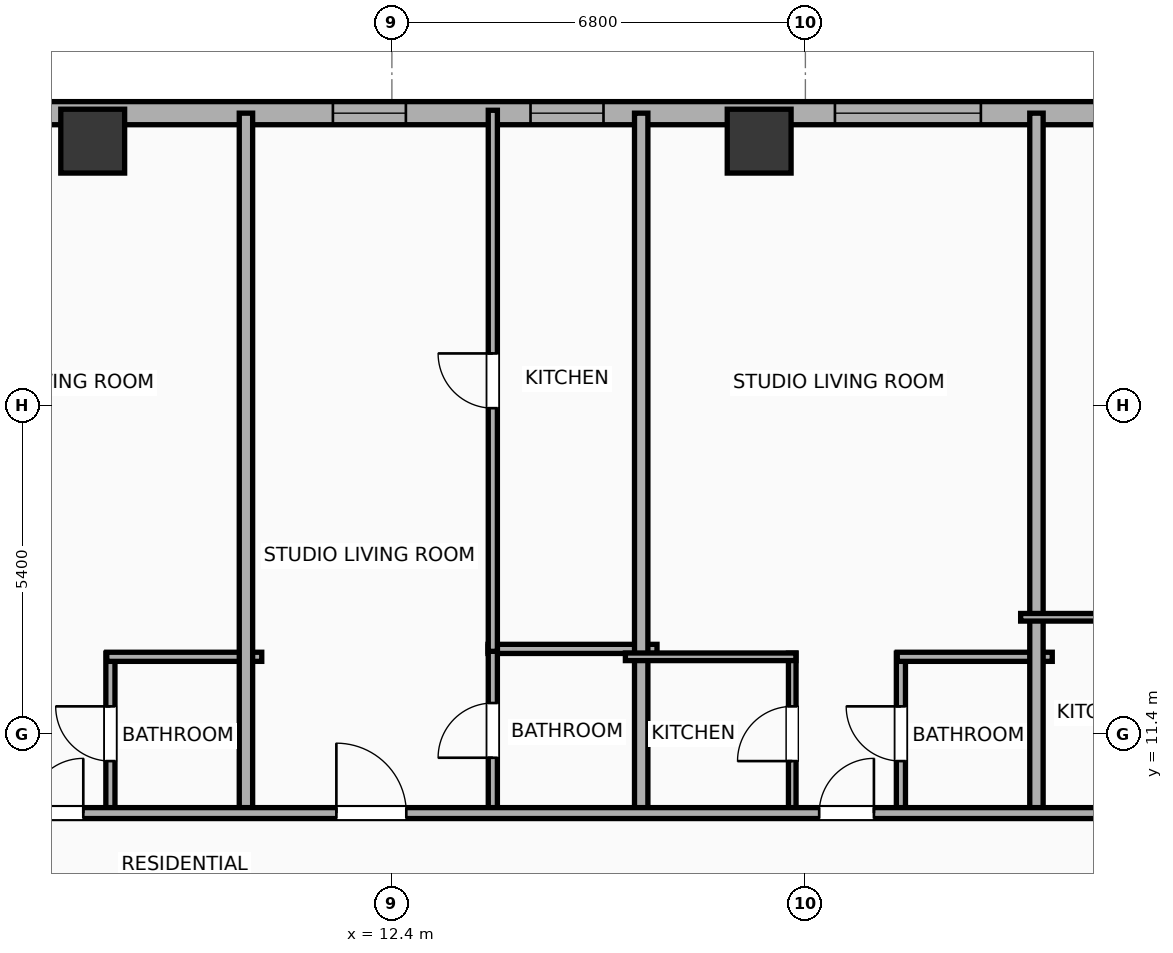
"""IFC4 building model, lengths in metres.
Left out: names, types, materials, properties, quantities, classifications, styles, units other than length and angle.
Written with IfcOpenShell. Run it as: python <this file> out.ifc"""

import sys

from ifc_helpers import new_model, si_unit, direction, frame, frame_2d, origin, origin_2d, place, context, subcontext, project, spatial, rectangle, hollow_rectangle, extrude, element, fill, save


model = new_model("IFC4")
c1 = context("Model", 3, precision=1e-05, world=origin(), true_north=direction((0.0, 1.0)))
c2 = subcontext(c1, "Body", "Model", "MODEL_VIEW")
j1 = project(units=[si_unit("LENGTHUNIT", "METRE"), si_unit("PLANEANGLEUNIT", "RADIAN")], contexts=[c1])
p1 = place(None, origin())
s1 = spatial("IfcSite", under=j1, at=p1, CompositionType="ELEMENT")
p2 = place(p1, origin())
s2 = spatial("IfcBuilding", under=s1, at=p2, CompositionType="ELEMENT")
p3 = place(p2, frame((0.0, 0.0, 128.7)))
s3 = spatial("IfcBuildingStorey", under=s2, at=p3, CompositionType="ELEMENT", Elevation=128.7)
for number, where, z_axis, x_axis in (
    (1, (18.44, 21.15, 0.0), (0.0, 0.0, 1.0), (1.0, 0.0, 0.0)),
    (2, (7.48, 21.15, 0.0), (0.0, 0.0, 1.0), (1.0, 0.0, 0.0)),
):
    element("IfcColumn", number, at=place(p3, frame(where, z_axis=z_axis, x_axis=x_axis)), inside=s3, PredefinedType="COLUMN", context=c2, shape_type="SweptSolid", body=[
        extrude(hollow_rectangle(XDim=1.05, YDim=1.05, WallThickness=0.036, at=origin_2d()), origin(), (0.0, 0.0, 1.0), 3.9),
    ])
p4 = place(p3, frame((-25.381, 21.61, 0.0), z_axis=(0.0, 0.0, 1.0), x_axis=(1.0, 0.0, 0.0)))
e3 = element("IfcWall", 3, at=p4, inside=s3, PredefinedType="ELEMENTEDWALL", context=c2, shape_type="SweptSolid", body=[
    extrude(rectangle(XDim=54.763, YDim=0.38, at=frame_2d((27.381, 0.0))), origin(), (0.0, 0.0, 1.0), 3.65),
])
p5 = place(p4, frame((5.645, 0.0, 0.75)))
e4 = element("IfcOpeningElement", 4, at=p5, cuts=e3, PredefinedType="OPENING", context=c2, shape_type="SweptSolid", body=[
    extrude(rectangle(XDim=2.4, YDim=2.1, at=frame_2d((1.2, 1.05))), frame((0.0, 0.2, 0.0), z_axis=(0.0, -1.0, 0.0), x_axis=(1.0, 0.0, 0.0)), (0.0, 0.0, 1.0), 0.4),
])
p6 = place(p4, frame((45.067, 0.0, 0.75)))
e5 = element("IfcOpeningElement", 5, at=p6, cuts=e3, PredefinedType="OPENING", context=c2, shape_type="SweptSolid", body=[
    extrude(rectangle(XDim=2.4, YDim=2.1, at=frame_2d((1.2, 1.05))), frame((0.0, 0.2, 0.0), z_axis=(0.0, -1.0, 0.0), x_axis=(1.0, 0.0, 0.0)), (0.0, 0.0, 1.0), 0.4),
])
p7 = place(p4, frame((1.286, 0.0, 0.75)))
e6 = element("IfcOpeningElement", 6, at=p7, cuts=e3, PredefinedType="OPENING", context=c2, shape_type="SweptSolid", body=[
    extrude(rectangle(XDim=1.2, YDim=2.05, at=frame_2d((0.6, 1.025))), frame((0.0, 0.2, 0.0), z_axis=(0.0, -1.0, 0.0), x_axis=(1.0, 0.0, 0.0)), (0.0, 0.0, 1.0), 0.4),
])
p8 = place(p4, frame((3.501, 0.0, 0.75)))
e7 = element("IfcOpeningElement", 7, at=p8, cuts=e3, PredefinedType="OPENING", context=c2, shape_type="SweptSolid", body=[
    extrude(rectangle(XDim=1.2, YDim=2.05, at=frame_2d((0.6, 1.025))), frame((0.0, 0.2, 0.0), z_axis=(0.0, -1.0, 0.0), x_axis=(1.0, 0.0, 0.0)), (0.0, 0.0, 1.0), 0.4),
])
p9 = place(p4, frame((12.031, 0.0, 0.75)))
e8 = element("IfcOpeningElement", 8, at=p9, cuts=e3, PredefinedType="OPENING", context=c2, shape_type="SweptSolid", body=[
    extrude(rectangle(XDim=1.2, YDim=2.05, at=frame_2d((0.6, 1.025))), frame((0.0, 0.2, 0.0), z_axis=(0.0, -1.0, 0.0), x_axis=(1.0, 0.0, 0.0)), (0.0, 0.0, 1.0), 0.4),
])
p10 = place(p4, frame((19.805, 0.0, 0.75)))
e9 = element("IfcOpeningElement", 9, at=p10, cuts=e3, PredefinedType="OPENING", context=c2, shape_type="SweptSolid", body=[
    extrude(rectangle(XDim=1.2, YDim=2.05, at=frame_2d((0.6, 1.025))), frame((0.0, 0.2, 0.0), z_axis=(0.0, -1.0, 0.0), x_axis=(1.0, 0.0, 0.0)), (0.0, 0.0, 1.0), 0.4),
])
p11 = place(p4, frame((16.555, 0.0, 0.75)))
e10 = element("IfcOpeningElement", 10, at=p11, cuts=e3, PredefinedType="OPENING", context=c2, shape_type="SweptSolid", body=[
    extrude(rectangle(XDim=1.2, YDim=2.05, at=frame_2d((0.6, 1.025))), frame((0.0, 0.2, 0.0), z_axis=(0.0, -1.0, 0.0), x_axis=(1.0, 0.0, 0.0)), (0.0, 0.0, 1.0), 0.4),
])
p12 = place(p4, frame((23.866, 0.0, 0.75)))
e11 = element("IfcOpeningElement", 11, at=p12, cuts=e3, PredefinedType="OPENING", context=c2, shape_type="SweptSolid", body=[
    extrude(rectangle(XDim=1.2, YDim=2.05, at=frame_2d((0.6, 1.025))), frame((0.0, 0.2, 0.0), z_axis=(0.0, -1.0, 0.0), x_axis=(1.0, 0.0, 0.0)), (0.0, 0.0, 1.0), 0.4),
])
p13 = place(p4, frame((27.116, 0.0, 0.75)))
e12 = element("IfcOpeningElement", 12, at=p13, cuts=e3, PredefinedType="OPENING", context=c2, shape_type="SweptSolid", body=[
    extrude(rectangle(XDim=1.2, YDim=2.05, at=frame_2d((0.6, 1.025))), frame((0.0, 0.2, 0.0), z_axis=(0.0, -1.0, 0.0), x_axis=(1.0, 0.0, 0.0)), (0.0, 0.0, 1.0), 0.4),
])
p14 = place(p4, frame((30.931, 0.0, 0.75)))
e13 = element("IfcOpeningElement", 13, at=p14, cuts=e3, PredefinedType="OPENING", context=c2, shape_type="SweptSolid", body=[
    extrude(rectangle(XDim=1.2, YDim=2.05, at=frame_2d((0.6, 1.025))), frame((0.0, 0.2, 0.0), z_axis=(0.0, -1.0, 0.0), x_axis=(1.0, 0.0, 0.0)), (0.0, 0.0, 1.0), 0.4),
])
p15 = place(p4, frame((36.811, 0.0, 0.75)))
e14 = element("IfcOpeningElement", 14, at=p15, cuts=e3, PredefinedType="OPENING", context=c2, shape_type="SweptSolid", body=[
    extrude(rectangle(XDim=1.2, YDim=2.05, at=frame_2d((0.6, 1.025))), frame((0.0, 0.2, 0.0), z_axis=(0.0, -1.0, 0.0), x_axis=(1.0, 0.0, 0.0)), (0.0, 0.0, 1.0), 0.4),
])
p16 = place(p4, frame((40.061, 0.0, 0.75)))
e15 = element("IfcOpeningElement", 15, at=p16, cuts=e3, PredefinedType="OPENING", context=c2, shape_type="SweptSolid", body=[
    extrude(rectangle(XDim=1.2, YDim=2.05, at=frame_2d((0.6, 1.025))), frame((0.0, 0.2, 0.0), z_axis=(0.0, -1.0, 0.0), x_axis=(1.0, 0.0, 0.0)), (0.0, 0.0, 1.0), 0.4),
])
p17 = place(p4, frame((50.527, 0.0, 0.75)))
e16 = element("IfcOpeningElement", 16, at=p17, cuts=e3, PredefinedType="OPENING", context=c2, shape_type="SweptSolid", body=[
    extrude(rectangle(XDim=1.2, YDim=2.05, at=frame_2d((0.6, 1.025))), frame((0.0, 0.2, 0.0), z_axis=(0.0, -1.0, 0.0), x_axis=(1.0, 0.0, 0.0)), (0.0, 0.0, 1.0), 0.4),
])
p18 = place(p3, frame((7.771, 10.08, 0.0), z_axis=(0.0, 0.0, 1.0), x_axis=(0.0, 1.0, 0.0)))
e17 = element("IfcWall", 17, at=p18, inside=s3, PredefinedType="PLUMBINGWALL", context=c2, shape_type="SweptSolid", body=[
    extrude(rectangle(XDim=2.65, YDim=0.15, at=frame_2d((1.325, 0.0))), origin(), (0.0, 0.0, 1.0), 3.65),
])
p19 = place(p18, frame((0.875, 0.0, 0.0)))
e18 = element("IfcOpeningElement", 18, at=p19, cuts=e17, PredefinedType="OPENING", context=c2, shape_type="SweptSolid", body=[
    extrude(rectangle(XDim=0.9, YDim=2.05, at=frame_2d((0.45, 1.025))), frame((0.0, 0.085, 0.0), z_axis=(0.0, -1.0, 0.0), x_axis=(1.0, 0.0, 0.0)), (0.0, 0.0, 1.0), 0.17),
])
p20 = place(p3, frame((7.711, 12.67, 0.0), z_axis=(0.0, 0.0, 1.0), x_axis=(1.0, 0.0, 0.0)))
e19 = element("IfcWall", 19, at=p20, inside=s3, PredefinedType="PLUMBINGWALL", context=c2, shape_type="SweptSolid", body=[
    extrude(rectangle(XDim=2.549, YDim=0.15, at=frame_2d((1.274, 0.0))), origin(), (0.0, 0.0, 1.0), 3.65),
])
p21 = place(p3, frame((10.0, 10.02, 0.0), z_axis=(0.0, 0.0, 1.0), x_axis=(0.0, 1.0, 0.0)))
e20 = element("IfcWall", 20, at=p21, inside=s3, PredefinedType="PARTITIONING", context=c2, shape_type="SweptSolid", body=[
    extrude(rectangle(XDim=11.59, YDim=0.22, at=frame_2d((5.795, 0.0))), origin(), (0.0, 0.0, 1.0), 3.65),
])
p22 = place(p3, frame((13.98, 12.8, 0.0), z_axis=(0.0, 0.0, 1.0), x_axis=(1.0, 0.0, 0.0)))
e21 = element("IfcWall", 21, at=p22, inside=s3, PredefinedType="PLUMBINGWALL", context=c2, shape_type="SweptSolid", body=[
    extrude(rectangle(XDim=2.78, YDim=0.15, at=frame_2d((1.39, 0.0))), origin(), (0.0, 0.0, 1.0), 3.65),
])
p23 = place(p3, frame((14.06, 10.08, 0.0), z_axis=(0.0, 0.0, 1.0), x_axis=(0.0, 1.0, 0.0)))
e22 = element("IfcWall", 22, at=p23, inside=s3, PredefinedType="PLUMBINGWALL", context=c2, shape_type="SweptSolid", body=[
    extrude(rectangle(XDim=2.76, YDim=0.15, at=frame_2d((1.38, 0.0))), origin(), (0.0, 0.0, 1.0), 3.65),
])
p24 = place(p23, frame((0.93, 0.0, 0.0)))
e23 = element("IfcOpeningElement", 23, at=p24, cuts=e22, PredefinedType="OPENING", context=c2, shape_type="SweptSolid", body=[
    extrude(rectangle(XDim=0.9, YDim=2.05, at=frame_2d((0.45, 1.025))), frame((0.0, 0.085, 0.0), z_axis=(0.0, -1.0, 0.0), x_axis=(1.0, 0.0, 0.0)), (0.0, 0.0, 1.0), 0.17),
])
p25 = place(p3, frame((14.06, 12.76, 0.0), z_axis=(0.0, 0.0, 1.0), x_axis=(0.0, 1.0, 0.0)))
e24 = element("IfcWall", 24, at=p25, inside=s3, PredefinedType="PLUMBINGWALL", context=c2, shape_type="SweptSolid", body=[
    extrude(rectangle(XDim=8.898, YDim=0.15, at=frame_2d((4.449, 0.0))), origin(), (0.0, 0.0, 1.0), 3.65),
])
p26 = place(p25, frame((3.999, 0.0, 0.0)))
e25 = element("IfcOpeningElement", 25, at=p26, cuts=e24, PredefinedType="OPENING", context=c2, shape_type="SweptSolid", body=[
    extrude(rectangle(XDim=0.9, YDim=2.05, at=frame_2d((0.45, 1.025))), frame((0.0, 0.085, 0.0), z_axis=(0.0, -1.0, 0.0), x_axis=(1.0, 0.0, 0.0)), (0.0, 0.0, 1.0), 0.17),
])
p27 = place(p3, frame((16.5, 10.02, 0.0), z_axis=(0.0, 0.0, 1.0), x_axis=(0.0, 1.0, 0.0)))
e26 = element("IfcWall", 26, at=p27, inside=s3, PredefinedType="PARTITIONING", context=c2, shape_type="SweptSolid", body=[
    extrude(rectangle(XDim=11.59, YDim=0.22, at=frame_2d((5.795, 0.0))), origin(), (0.0, 0.0, 1.0), 3.65),
])
p28 = place(p3, frame((18.984, 10.08, 0.0), z_axis=(0.0, 0.0, 1.0), x_axis=(0.0, 1.0, 0.0)))
e27 = element("IfcWall", 27, at=p28, inside=s3, PredefinedType="PARTITIONING", context=c2, shape_type="SweptSolid", body=[
    extrude(rectangle(XDim=2.65, YDim=0.125, at=frame_2d((1.325, 0.0))), origin(), (0.0, 0.0, 1.0), 3.04),
])
p29 = place(p28, frame((0.875, 0.0, 0.0)))
e28 = element("IfcOpeningElement", 28, at=p29, cuts=e27, PredefinedType="OPENING", context=c2, shape_type="SweptSolid", body=[
    extrude(rectangle(XDim=0.9, YDim=2.05, at=frame_2d((0.45, 1.025))), frame((0.0, 0.073, 0.0), z_axis=(0.0, -1.0, 0.0), x_axis=(1.0, 0.0, 0.0)), (0.0, 0.0, 1.0), 0.145),
])
p30 = place(p3, frame((20.771, 10.08, 0.0), z_axis=(0.0, 0.0, 1.0), x_axis=(0.0, 1.0, 0.0)))
e29 = element("IfcWall", 29, at=p30, inside=s3, PredefinedType="PLUMBINGWALL", context=c2, shape_type="SweptSolid", body=[
    extrude(rectangle(XDim=2.65, YDim=0.15, at=frame_2d((1.325, 0.0))), origin(), (0.0, 0.0, 1.0), 3.65),
])
p31 = place(p30, frame((0.875, 0.0, 0.0)))
e30 = element("IfcOpeningElement", 30, at=p31, cuts=e29, PredefinedType="OPENING", context=c2, shape_type="SweptSolid", body=[
    extrude(rectangle(XDim=0.9, YDim=2.05, at=frame_2d((0.45, 1.025))), frame((0.0, 0.085, 0.0), z_axis=(0.0, -1.0, 0.0), x_axis=(1.0, 0.0, 0.0)), (0.0, 0.0, 1.0), 0.17),
])
p32 = place(p3, frame((16.24, 12.67, 0.0), z_axis=(0.0, 0.0, 1.0), x_axis=(1.0, 0.0, 0.0)))
e31 = element("IfcWall", 31, at=p32, inside=s3, PredefinedType="PARTITIONING", context=c2, shape_type="SweptSolid", body=[
    extrude(rectangle(XDim=2.804, YDim=0.125, at=frame_2d((1.402, 0.0))), origin(), (0.0, 0.0, 1.0), 3.65),
])
p33 = place(p3, frame((20.711, 12.67, 0.0), z_axis=(0.0, 0.0, 1.0), x_axis=(1.0, 0.0, 0.0)))
e32 = element("IfcWall", 32, at=p33, inside=s3, PredefinedType="PLUMBINGWALL", context=c2, shape_type="SweptSolid", body=[
    extrude(rectangle(XDim=2.549, YDim=0.15, at=frame_2d((1.274, 0.0))), origin(), (0.0, 0.0, 1.0), 3.65),
])
p34 = place(p3, frame((23.0, 10.02, 0.0), z_axis=(0.0, 0.0, 1.0), x_axis=(0.0, 1.0, 0.0)))
e33 = element("IfcWall", 33, at=p34, inside=s3, PredefinedType="PARTITIONING", context=c2, shape_type="SweptSolid", body=[
    extrude(rectangle(XDim=11.59, YDim=0.22, at=frame_2d((5.795, 0.0))), origin(), (0.0, 0.0, 1.0), 3.65),
])
p35 = place(p3, frame((22.74, 13.32, 0.0), z_axis=(0.0, 0.0, 1.0), x_axis=(1.0, 0.0, 0.0)))
e34 = element("IfcWall", 34, at=p35, inside=s3, PredefinedType="PARTITIONING", context=c2, shape_type="SweptSolid", body=[
    extrude(rectangle(XDim=3.243, YDim=0.125, at=frame_2d((1.622, 0.0))), origin(), (0.0, 0.0, 1.0), 3.65),
])
p36 = place(p3, frame((-29.21, 10.1, 0.0), z_axis=(0.0, 0.0, 1.0), x_axis=(1.0, 0.0, 0.0)))
e35 = element("IfcWall", 35, at=p36, inside=s3, PredefinedType="PARTITIONING", context=c2, shape_type="SweptSolid", body=[
    extrude(rectangle(XDim=62.42, YDim=0.18, at=frame_2d((31.21, 0.0))), origin(), (0.0, 0.0, 1.0), 3.65),
])
p37 = place(p36, frame((3.033, 0.0, 0.0)))
e36 = element("IfcOpeningElement", 36, at=p37, cuts=e35, PredefinedType="OPENING", context=c2, shape_type="SweptSolid", body=[
    extrude(rectangle(XDim=0.9, YDim=2.05, at=frame_2d((0.45, 1.025))), frame((0.0, 0.1, 0.0), z_axis=(0.0, -1.0, 0.0), x_axis=(1.0, 0.0, 0.0)), (0.0, 0.0, 1.0), 0.2),
])
p38 = place(p36, frame((10.573, 0.0, 0.0)))
e37 = element("IfcOpeningElement", 37, at=p38, cuts=e35, PredefinedType="OPENING", context=c2, shape_type="SweptSolid", body=[
    extrude(rectangle(XDim=1.15, YDim=2.05, at=frame_2d((0.575, 1.025))), frame((0.0, 0.1, 0.0), z_axis=(0.0, -1.0, 0.0), x_axis=(1.0, 0.0, 0.0)), (0.0, 0.0, 1.0), 0.2),
])
p39 = place(p36, frame((16.135, 0.0, 0.0)))
e38 = element("IfcOpeningElement", 38, at=p39, cuts=e35, PredefinedType="OPENING", context=c2, shape_type="SweptSolid", body=[
    extrude(rectangle(XDim=0.9, YDim=2.05, at=frame_2d((0.45, 1.025))), frame((0.0, 0.1, 0.0), z_axis=(0.0, -1.0, 0.0), x_axis=(1.0, 0.0, 0.0)), (0.0, 0.0, 1.0), 0.2),
])
p40 = place(p36, frame((23.632, 0.0, 0.0)))
e39 = element("IfcOpeningElement", 39, at=p40, cuts=e35, PredefinedType="OPENING", context=c2, shape_type="SweptSolid", body=[
    extrude(rectangle(XDim=1.15, YDim=2.05, at=frame_2d((0.575, 1.025))), frame((0.0, 0.1, 0.0), z_axis=(0.0, -1.0, 0.0), x_axis=(1.0, 0.0, 0.0)), (0.0, 0.0, 1.0), 0.2),
])
p41 = place(p36, frame((27.751, 0.0, 0.0)))
e40 = element("IfcOpeningElement", 40, at=p41, cuts=e35, PredefinedType="OPENING", context=c2, shape_type="SweptSolid", body=[
    extrude(rectangle(XDim=1.15, YDim=2.05, at=frame_2d((0.575, 1.025))), frame((0.0, 0.1, 0.0), z_axis=(0.0, -1.0, 0.0), x_axis=(1.0, 0.0, 0.0)), (0.0, 0.0, 1.0), 0.2),
])
p42 = place(p36, frame((35.635, 0.0, 0.0)))
e41 = element("IfcOpeningElement", 41, at=p42, cuts=e35, PredefinedType="OPENING", context=c2, shape_type="SweptSolid", body=[
    extrude(rectangle(XDim=0.9, YDim=2.05, at=frame_2d((0.45, 1.025))), frame((0.0, 0.1, 0.0), z_axis=(0.0, -1.0, 0.0), x_axis=(1.0, 0.0, 0.0)), (0.0, 0.0, 1.0), 0.2),
])
p43 = place(p36, frame((40.697, 0.0, 0.0)))
e42 = element("IfcOpeningElement", 42, at=p43, cuts=e35, PredefinedType="OPENING", context=c2, shape_type="SweptSolid", body=[
    extrude(rectangle(XDim=1.15, YDim=2.05, at=frame_2d((0.575, 1.025))), frame((0.0, 0.1, 0.0), z_axis=(0.0, -1.0, 0.0), x_axis=(1.0, 0.0, 0.0)), (0.0, 0.0, 1.0), 0.2),
])
p44 = place(p36, frame((48.637, 0.0, 0.0)))
e43 = element("IfcOpeningElement", 43, at=p44, cuts=e35, PredefinedType="OPENING", context=c2, shape_type="SweptSolid", body=[
    extrude(rectangle(XDim=0.9, YDim=2.05, at=frame_2d((0.45, 1.025))), frame((0.0, 0.1, 0.0), z_axis=(0.0, -1.0, 0.0), x_axis=(1.0, 0.0, 0.0)), (0.0, 0.0, 1.0), 0.2),
])
p45 = place(p36, frame((57.213, 0.0, 0.0)))
e44 = element("IfcOpeningElement", 44, at=p45, cuts=e35, PredefinedType="OPENING", context=c2, shape_type="SweptSolid", body=[
    extrude(rectangle(XDim=1.15, YDim=2.05, at=frame_2d((0.575, 1.025))), frame((0.0, 0.1, 0.0), z_axis=(0.0, -1.0, 0.0), x_axis=(1.0, 0.0, 0.0)), (0.0, 0.0, 1.0), 0.2),
])
p46 = place(p6, origin())
e45 = element("IfcWindow", 45, at=p46, inside=s3, PartitioningType="SINGLE_PANEL", PredefinedType="WINDOW", context=c2, shape_type="SweptSolid", body=[
    extrude(rectangle(XDim=2.4, YDim=2.1, at=frame_2d((1.2, 1.05))), frame((0.0, 0.03, 0.0), z_axis=(0.0, -1.0, 0.0), x_axis=(1.0, 0.0, 0.0)), (0.0, 0.0, 1.0), 0.06),
])
fill(e5, e45)
p47 = place(p15, origin())
e46 = element("IfcWindow", 46, at=p47, inside=s3, PartitioningType="SINGLE_PANEL", PredefinedType="WINDOW", context=c2, shape_type="SweptSolid", body=[
    extrude(rectangle(XDim=1.2, YDim=2.05, at=frame_2d((0.6, 1.025))), frame((0.0, 0.03, 0.0), z_axis=(0.0, -1.0, 0.0), x_axis=(1.0, 0.0, 0.0)), (0.0, 0.0, 1.0), 0.06),
])
fill(e14, e46)
p48 = place(p16, origin())
e47 = element("IfcWindow", 47, at=p48, inside=s3, PartitioningType="SINGLE_PANEL", PredefinedType="WINDOW", context=c2, shape_type="SweptSolid", body=[
    extrude(rectangle(XDim=1.2, YDim=2.05, at=frame_2d((0.6, 1.025))), frame((0.0, 0.03, 0.0), z_axis=(0.0, -1.0, 0.0), x_axis=(1.0, 0.0, 0.0)), (0.0, 0.0, 1.0), 0.06),
])
fill(e15, e47)
p49 = place(p19, origin())
e48 = element("IfcDoor", 48, at=p49, inside=s3, OperationType="SINGLE_SWING_RIGHT", PredefinedType="DOOR", context=c2, shape_type="SweptSolid", body=[
    extrude(rectangle(XDim=0.9, YDim=2.05, at=frame_2d((0.45, 1.025))), frame((0.0, 0.025, 0.0), z_axis=(0.0, -1.0, 0.0), x_axis=(1.0, 0.0, 0.0)), (0.0, 0.0, 1.0), 0.05),
])
fill(e18, e48)
p50 = place(p24, origin())
e49 = element("IfcDoor", 49, at=p50, inside=s3, OperationType="SINGLE_SWING_LEFT", PredefinedType="DOOR", context=c2, shape_type="SweptSolid", body=[
    extrude(rectangle(XDim=0.9, YDim=2.05, at=frame_2d((0.45, 1.025))), frame((0.0, 0.025, 0.0), z_axis=(0.0, -1.0, 0.0), x_axis=(1.0, 0.0, 0.0)), (0.0, 0.0, 1.0), 0.05),
])
fill(e23, e49)
p51 = place(p26, origin())
e50 = element("IfcDoor", 50, at=p51, inside=s3, OperationType="SINGLE_SWING_RIGHT", PredefinedType="DOOR", context=c2, shape_type="SweptSolid", body=[
    extrude(rectangle(XDim=0.9, YDim=2.05, at=frame_2d((0.45, 1.025))), frame((0.0, 0.025, 0.0), z_axis=(0.0, -1.0, 0.0), x_axis=(1.0, 0.0, 0.0)), (0.0, 0.0, 1.0), 0.05),
])
fill(e25, e50)
p52 = place(p29, origin())
e51 = element("IfcDoor", 51, at=p52, inside=s3, OperationType="SINGLE_SWING_LEFT", PredefinedType="DOOR", context=c2, shape_type="SweptSolid", body=[
    extrude(rectangle(XDim=0.9, YDim=2.05, at=frame_2d((0.45, 1.025))), frame((0.0, 0.025, 0.0), z_axis=(0.0, -1.0, 0.0), x_axis=(1.0, 0.0, 0.0)), (0.0, 0.0, 1.0), 0.05),
])
fill(e28, e51)
p53 = place(p31, origin())
e52 = element("IfcDoor", 52, at=p53, inside=s3, OperationType="SINGLE_SWING_RIGHT", PredefinedType="DOOR", context=c2, shape_type="SweptSolid", body=[
    extrude(rectangle(XDim=0.9, YDim=2.05, at=frame_2d((0.45, 1.025))), frame((0.0, 0.025, 0.0), z_axis=(0.0, -1.0, 0.0), x_axis=(1.0, 0.0, 0.0)), (0.0, 0.0, 1.0), 0.05),
])
fill(e30, e52)
p54 = place(p42, origin())
e53 = element("IfcDoor", 53, at=p54, inside=s3, OperationType="SINGLE_SWING_RIGHT", PredefinedType="DOOR", context=c2, shape_type="SweptSolid", body=[
    extrude(rectangle(XDim=0.9, YDim=2.05, at=frame_2d((0.45, 1.025))), frame((0.0, 0.025, 0.0), z_axis=(0.0, -1.0, 0.0), x_axis=(1.0, 0.0, 0.0)), (0.0, 0.0, 1.0), 0.05),
])
fill(e41, e53)
p55 = place(p43, origin())
e54 = element("IfcDoor", 54, at=p55, inside=s3, OperationType="SINGLE_SWING_LEFT", PredefinedType="DOOR", context=c2, shape_type="SweptSolid", body=[
    extrude(rectangle(XDim=1.15, YDim=2.05, at=frame_2d((0.575, 1.025))), frame((0.0, 0.025, 0.0), z_axis=(0.0, -1.0, 0.0), x_axis=(1.0, 0.0, 0.0)), (0.0, 0.0, 1.0), 0.05),
])
fill(e42, e54)
p56 = place(p44, origin())
e55 = element("IfcDoor", 55, at=p56, inside=s3, OperationType="SINGLE_SWING_RIGHT", PredefinedType="DOOR", context=c2, shape_type="SweptSolid", body=[
    extrude(rectangle(XDim=0.9, YDim=2.05, at=frame_2d((0.45, 1.025))), frame((0.0, 0.025, 0.0), z_axis=(0.0, -1.0, 0.0), x_axis=(1.0, 0.0, 0.0)), (0.0, 0.0, 1.0), 0.05),
])
fill(e43, e55)
save(model, sys.argv[1])
